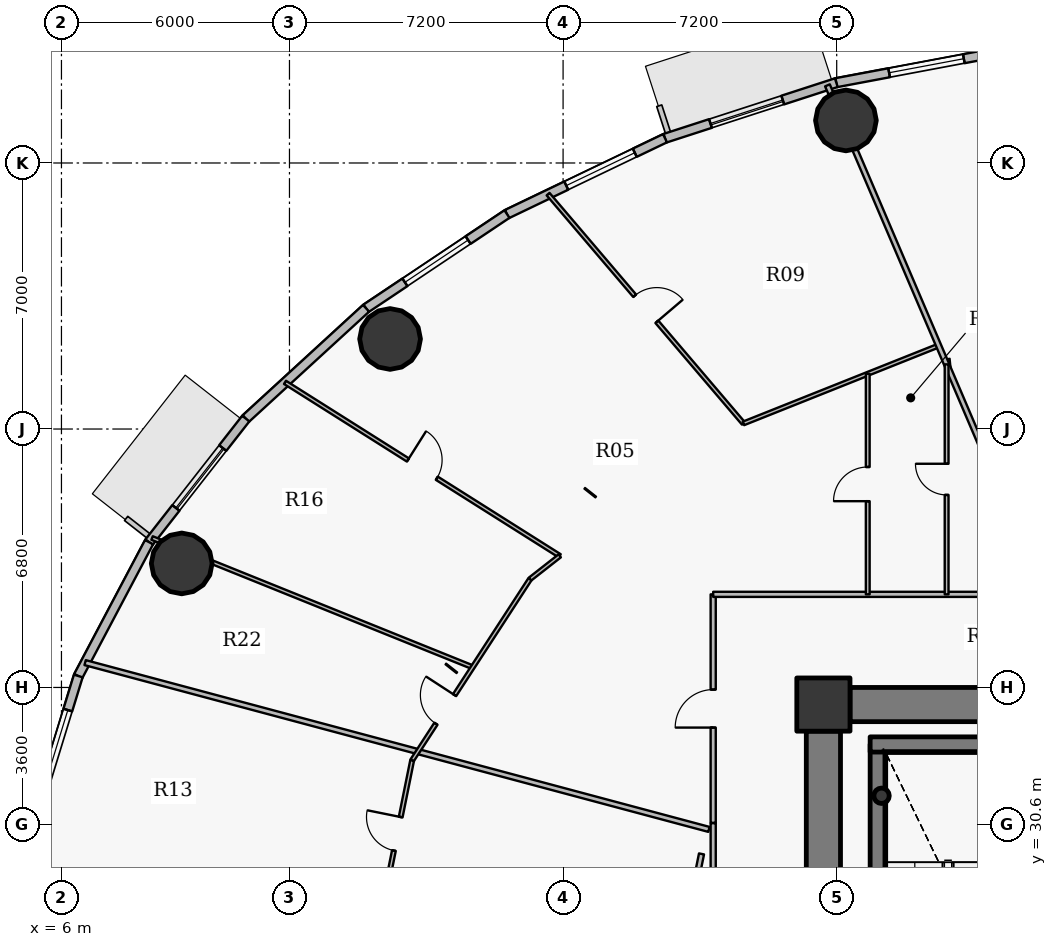
"""IFC4 building model, lengths in metres.
Left out: names, types, materials, properties, quantities, classifications, styles, units other than length and angle.
Written with IfcOpenShell. Run it as: python <this file> out.ifc"""

import sys

from ifc_helpers import new_model, si_unit, direction, frame, frame_2d, origin, origin_2d, place, context, subcontext, project, spatial, rectangle, hollow_circle, extrude, source, transform, mapped, element, fill, save


model = new_model("IFC4")
c1 = context("Model", 3, precision=1e-05, world=origin(), true_north=direction((0.0, 1.0)))
c2 = subcontext(c1, "Body", "Model", "MODEL_VIEW")
j1 = project(units=[si_unit("LENGTHUNIT", "METRE"), si_unit("PLANEANGLEUNIT", "RADIAN")], contexts=[c1])
p1 = place(None, origin())
s1 = spatial("IfcSite", under=j1, at=p1, CompositionType="ELEMENT")
p2 = place(p1, origin())
s2 = spatial("IfcBuilding", under=s1, at=p2, CompositionType="ELEMENT")
p3 = place(p2, frame((0.0, 0.0, 74.4)))
s3 = spatial("IfcBuildingStorey", under=s2, at=p3, CompositionType="ELEMENT", Elevation=74.4)
p4 = place(p3, frame((26.05, 33.75, 0.0), z_axis=(0.0, 0.0, 1.0), x_axis=(1.0, 0.0, 0.0)))
e1 = element("IfcColumn", 1, at=p4, inside=s3, PredefinedType="COLUMN", context=c2, shape_type="SweptSolid", body=[
    extrude(rectangle(XDim=1.4, YDim=1.4, at=origin_2d()), origin(), (0.0, 0.0, 1.0), 4.2),
])
p5 = place(p3, frame((27.48, 24.1, 0.0), z_axis=(0.0, 0.0, 1.0), x_axis=(0.0, 1.0, 0.0)))
e2 = element("IfcWall", 2, at=p5, inside=s3, PredefinedType="SHEAR", context=c2, shape_type="SweptSolid", body=[
    extrude(rectangle(XDim=8.6, YDim=0.4, at=frame_2d((4.3, 0.0))), origin(), (0.0, 0.0, 1.0), 4.2),
])
p6 = place(p3, frame((27.28, 32.7, 0.0), z_axis=(0.0, 0.0, 1.0), x_axis=(1.0, 0.0, 0.0)))
e3 = element("IfcWall", 3, at=p6, inside=s3, PredefinedType="SHEAR", context=c2, shape_type="SweptSolid", body=[
    extrude(rectangle(XDim=4.1, YDim=0.4, at=frame_2d((2.05, 0.0))), origin(), (0.0, 0.0, 1.0), 4.2),
])
p7 = place(p3, frame((27.58, 31.35, 0.0), z_axis=(0.0, 0.0, 1.0), x_axis=(1.0, 0.0, 0.0)))
e4 = element("IfcColumn", 4, at=p7, inside=s3, PredefinedType="COLUMN", context=c2, shape_type="SweptSolid", body=[
    extrude(hollow_circle(Radius=0.203, WallThickness=0.016, at=origin_2d()), origin(), (0.0, 0.0, 1.0), 4.2),
])
p8 = place(p3, frame((26.75, 33.75, 0.0), z_axis=(0.0, 0.0, 1.0), x_axis=(1.0, 0.0, 0.0)))
e5 = element("IfcWall", 5, at=p8, inside=s3, PredefinedType="SHEAR", context=c2, shape_type="SweptSolid", body=[
    extrude(rectangle(XDim=18.5, YDim=0.9, at=frame_2d((9.25, 0.0))), origin(), (0.0, 0.0, 1.0), 3.4),
])
p9 = place(p3, frame((26.05, 20.95, 0.0), z_axis=(0.0, 0.0, 1.0), x_axis=(0.0, 1.0, 0.0)))
e6 = element("IfcWall", 6, at=p9, inside=s3, PredefinedType="SHEAR", context=c2, shape_type="SweptSolid", body=[
    extrude(rectangle(XDim=12.1, YDim=0.9, at=frame_2d((6.05, 0.0))), origin(), (0.0, 0.0, 1.0), 3.4),
])
p10 = place(p9, frame((5.64, 0.0, 0.0)))
e7 = element("IfcOpeningElement", 7, at=p10, cuts=e6, PredefinedType="OPENING", context=c2, shape_type="SweptSolid", body=[
    extrude(rectangle(XDim=0.82, YDim=2.1, at=origin_2d()), frame((0.41, 0.46, 1.05), z_axis=(0.0, -1.0, 0.0), x_axis=(1.0, 0.0, 0.0)), (0.0, 0.0, 1.0), 0.92),
])
for number, where, z_axis, x_axis in (
    (8, (26.642, 49.12, 0.0), (0.0, 0.0, 1.0), (1.0, 0.0, 0.0)),
    (9, (14.647, 43.369, 0.0), (0.0, 0.0, 1.0), (1.0, 0.0, 0.0)),
    (10, (9.165, 37.464, 0.0), (0.0, 0.0, 1.0), (1.0, 0.0, 0.0)),
):
    element("IfcColumn", number, at=place(p3, frame(where, z_axis=z_axis, x_axis=x_axis)), inside=s3, PredefinedType="COLUMN", context=c2, shape_type="SweptSolid", body=[
        extrude(hollow_circle(Radius=0.8, WallThickness=0.045, at=origin_2d()), origin(), (0.0, 0.0, 1.0), 4.2),
    ])
p11 = place(p3, frame((26.389, 50.113, 0.0), z_axis=(0.0, 0.0, 1.0), x_axis=(0.982791952378, 0.184715939598, 0.0)))
e11 = element("IfcWall", 11, at=p11, inside=s3, PredefinedType="SOLIDWALL", context=c2, shape_type="SweptSolid", body=[
    extrude(rectangle(XDim=4.828, YDim=0.24, at=frame_2d((2.414, 0.0))), origin(), (0.0, 0.0, 1.0), 3.95),
])
p12 = place(p11, frame((1.414, 0.0, 0.9)))
e12 = element("IfcOpeningElement", 12, at=p12, cuts=e11, PredefinedType="OPENING", context=c2, shape_type="SweptSolid", body=[
    extrude(rectangle(XDim=2.0, YDim=1.75, at=origin_2d()), frame((1.0, 0.13, 0.875), z_axis=(0.0, -1.0, 0.0), x_axis=(1.0, 0.0, 0.0)), (0.0, 0.0, 1.0), 0.26),
])
p13 = place(p3, frame((21.882, 48.651, 0.0), z_axis=(0.0, 0.0, 1.0), x_axis=(0.951207699013, 0.308551313946, 0.0)))
e13 = element("IfcWall", 13, at=p13, inside=s3, PredefinedType="SOLIDWALL", context=c2, shape_type="SweptSolid", body=[
    extrude(rectangle(XDim=4.739, YDim=0.24, at=frame_2d((2.369, 0.0))), origin(), (0.0, 0.0, 1.0), 3.95),
])
p14 = place(p13, frame((1.258, 0.0, 0.9)))
e14 = element("IfcOpeningElement", 14, at=p14, cuts=e13, PredefinedType="OPENING", context=c2, shape_type="SweptSolid", body=[
    extrude(rectangle(XDim=2.0, YDim=1.75, at=origin_2d()), frame((1.0, 0.13, 0.875), z_axis=(0.0, -1.0, 0.0), x_axis=(1.0, 0.0, 0.0)), (0.0, 0.0, 1.0), 0.26),
])
p15 = place(p3, frame((17.723, 46.656, 0.0), z_axis=(0.0, 0.0, 1.0), x_axis=(0.901601503137, 0.432567601123, 0.0)))
e15 = element("IfcWall", 15, at=p15, inside=s3, PredefinedType="SOLIDWALL", context=c2, shape_type="SweptSolid", body=[
    extrude(rectangle(XDim=4.613, YDim=0.24, at=frame_2d((2.306, 0.0))), origin(), (0.0, 0.0, 1.0), 3.95),
])
p16 = place(p15, frame((1.731, 0.0, 0.9)))
e16 = element("IfcOpeningElement", 16, at=p16, cuts=e15, PredefinedType="OPENING", context=c2, shape_type="SweptSolid", body=[
    extrude(rectangle(XDim=2.0, YDim=1.75, at=origin_2d()), frame((1.0, 0.13, 0.875), z_axis=(0.0, -1.0, 0.0), x_axis=(1.0, 0.0, 0.0)), (0.0, 0.0, 1.0), 0.26),
])
p17 = place(p3, frame((14.015, 44.176, 0.0), z_axis=(0.0, 0.0, 1.0), x_axis=(0.831240982525, 0.555912249343, 0.0)))
e17 = element("IfcWall", 17, at=p17, inside=s3, PredefinedType="SOLIDWALL", context=c2, shape_type="SweptSolid", body=[
    extrude(rectangle(XDim=4.46, YDim=0.24, at=frame_2d((2.23, 0.0))), origin(), (0.0, 0.0, 1.0), 3.95),
])
p18 = place(p17, frame((1.23, 0.0, 0.9)))
e18 = element("IfcOpeningElement", 18, at=p18, cuts=e17, PredefinedType="OPENING", context=c2, shape_type="SweptSolid", body=[
    extrude(rectangle(XDim=2.0, YDim=1.75, at=origin_2d()), frame((1.0, 0.13, 0.875), z_axis=(0.0, -1.0, 0.0), x_axis=(1.0, 0.0, 0.0)), (0.0, 0.0, 1.0), 0.26),
])
p19 = place(p3, frame((10.85, 41.275, 0.0), z_axis=(0.0, 0.0, 1.0), x_axis=(0.737116376281, 0.67576582321, 0.0)))
e19 = element("IfcWall", 19, at=p19, inside=s3, PredefinedType="SOLIDWALL", context=c2, shape_type="SweptSolid", body=[
    extrude(rectangle(XDim=4.294, YDim=0.24, at=frame_2d((2.147, 0.0))), origin(), (0.0, 0.0, 1.0), 3.95),
])
p20 = place(p3, frame((8.305, 38.023, 0.0), z_axis=(0.0, 0.0, 1.0), x_axis=(0.616295508253, 0.787514981767, 0.0)))
e20 = element("IfcWall", 20, at=p20, inside=s3, PredefinedType="SOLIDWALL", context=c2, shape_type="SweptSolid", body=[
    extrude(rectangle(XDim=4.129, YDim=0.24, at=frame_2d((2.065, 0.0))), origin(), (0.0, 0.0, 1.0), 3.95),
])
p21 = place(p20, frame((1.146, 0.0, 0.9)))
e21 = element("IfcOpeningElement", 21, at=p21, cuts=e20, PredefinedType="OPENING", context=c2, shape_type="SweptSolid", body=[
    extrude(rectangle(XDim=2.0, YDim=1.75, at=origin_2d()), frame((1.0, 0.13, 0.875), z_axis=(0.0, -1.0, 0.0), x_axis=(1.0, 0.0, 0.0)), (0.0, 0.0, 1.0), 0.26),
])
p22 = place(p3, frame((6.442, 34.501, 0.0), z_axis=(0.0, 0.0, 1.0), x_axis=(0.467662443071, 0.883907144072, 0.0)))
e22 = element("IfcWall", 22, at=p22, inside=s3, PredefinedType="SOLIDWALL", context=c2, shape_type="SweptSolid", body=[
    extrude(rectangle(XDim=3.984, YDim=0.24, at=frame_2d((1.992, 0.0))), origin(), (0.0, 0.0, 1.0), 3.95),
])
p23 = place(p3, frame((5.307, 30.797, 0.0), z_axis=(0.0, 0.0, 1.0), x_axis=(0.293111631758, 0.956078224482, 0.0)))
e23 = element("IfcWall", 23, at=p23, inside=s3, PredefinedType="SOLIDWALL", context=c2, shape_type="SweptSolid", body=[
    extrude(rectangle(XDim=3.875, YDim=0.24, at=frame_2d((1.938, 0.0))), origin(), (0.0, 0.0, 1.0), 3.95),
])
p24 = place(p23, frame((0.938, 0.0, 0.9)))
e24 = element("IfcOpeningElement", 24, at=p24, cuts=e23, PredefinedType="OPENING", context=c2, shape_type="SweptSolid", body=[
    extrude(rectangle(XDim=2.0, YDim=1.75, at=origin_2d()), frame((1.0, 0.13, 0.875), z_axis=(0.0, -1.0, 0.0), x_axis=(1.0, 0.0, 0.0)), (0.0, 0.0, 1.0), 0.26),
])
p25 = place(p3, frame((6.623, 34.854, 0.0), z_axis=(0.0, 0.0, 1.0), x_axis=(0.966073053026, -0.258268961003, 0.0)))
e25 = element("IfcWall", 25, at=p25, inside=s3, PredefinedType="PARTITIONING", context=c2, shape_type="SweptSolid", body=[
    extrude(rectangle(XDim=16.991, YDim=0.135, at=frame_2d((8.495, 0.0))), origin(), (0.0, 0.0, 1.0), 3.335),
])
p26 = place(p3, frame((8.385, 38.132, 0.0), z_axis=(0.0, 0.0, 1.0), x_axis=(0.927473750459, -0.373888275037, 0.0)))
e26 = element("IfcWall", 26, at=p26, inside=s3, PredefinedType="PARTITIONING", context=c2, shape_type="SweptSolid", body=[
    extrude(rectangle(XDim=9.096, YDim=0.1, at=frame_2d((4.548, 0.0))), origin(), (0.0, 0.0, 1.0), 3.285),
])
p27 = place(p3, frame((11.882, 42.228, 0.0), z_axis=(0.0, 0.0, 1.0), x_axis=(0.845549287721, -0.533897370319, 0.0)))
e27 = element("IfcWall", 27, at=p27, inside=s3, PredefinedType="PARTITIONING", context=c2, shape_type="SweptSolid", body=[
    extrude(rectangle(XDim=8.55, YDim=0.1, at=frame_2d((4.275, 0.0))), origin(), (0.0, 0.0, 1.0), 3.335),
])
p28 = place(p27, frame((3.825, 0.0, 0.0)))
e28 = element("IfcOpeningElement", 28, at=p28, cuts=e27, PredefinedType="OPENING", context=c2, shape_type="SweptSolid", body=[
    extrude(rectangle(XDim=0.9, YDim=2.1, at=origin_2d()), frame((0.45, 0.06, 1.05), z_axis=(0.0, -1.0, 0.0), x_axis=(1.0, 0.0, 0.0)), (0.0, 0.0, 1.0), 0.12),
])
p29 = place(p3, frame((14.16, 27.0, 0.0), z_axis=(0.0, 0.0, 1.0), x_axis=(0.198292702032, 0.980142848936, 0.0)))
e29 = element("IfcWall", 29, at=p29, inside=s3, PredefinedType="PARTITIONING", context=c2, shape_type="SweptSolid", body=[
    extrude(rectangle(XDim=5.392, YDim=0.1, at=frame_2d((2.696, 0.0))), origin(), (0.0, 0.0, 1.0), 3.285),
])
p30 = place(p29, frame((2.967, 0.0, 0.0)))
e30 = element("IfcOpeningElement", 30, at=p30, cuts=e29, PredefinedType="OPENING", context=c2, shape_type="SweptSolid", body=[
    extrude(rectangle(XDim=0.9, YDim=2.1, at=origin_2d()), frame((0.45, 0.06, 1.05), z_axis=(0.0, -1.0, 0.0), x_axis=(1.0, 0.0, 0.0)), (0.0, 0.0, 1.0), 0.12),
])
p31 = place(p3, frame((15.229, 32.284, 0.0), z_axis=(0.0, 0.0, 1.0), x_axis=(0.545394142426, 0.83817971188, 0.0)))
e31 = element("IfcWall", 31, at=p31, inside=s3, PredefinedType="PARTITIONING", context=c2, shape_type="SweptSolid", body=[
    extrude(rectangle(XDim=5.688, YDim=0.1, at=frame_2d((2.844, 0.0))), origin(), (0.0, 0.0, 1.0), 3.285),
])
p32 = place(p31, frame((1.146, 0.0, 0.0)))
e32 = element("IfcOpeningElement", 32, at=p32, cuts=e31, PredefinedType="OPENING", context=c2, shape_type="SweptSolid", body=[
    extrude(rectangle(XDim=0.9, YDim=2.1, at=origin_2d()), frame((0.45, 0.06, 1.05), z_axis=(0.0, -1.0, 0.0), x_axis=(1.0, 0.0, 0.0)), (0.0, 0.0, 1.0), 0.12),
])
p33 = place(p3, frame((18.331, 37.052, 0.0), z_axis=(0.0, 0.0, 1.0), x_axis=(0.787385450927, 0.616460989575, 0.0)))
e33 = element("IfcWall", 33, at=p33, inside=s3, PredefinedType="PARTITIONING", context=c2, shape_type="SweptSolid", body=[
    extrude(rectangle(XDim=0.991, YDim=0.1, at=frame_2d((0.496, 0.0))), origin(), (0.0, 0.0, 1.0), 3.635),
])
p34 = place(p3, frame((18.805, 47.181, 0.0), z_axis=(0.0, 0.0, 1.0), x_axis=(0.648556358155, -0.761166637667, 0.0)))
e34 = element("IfcWall", 34, at=p34, inside=s3, PredefinedType="PARTITIONING", context=c2, shape_type="SweptSolid", body=[
    extrude(rectangle(XDim=7.926, YDim=0.1, at=frame_2d((3.963, 0.0))), origin(), (0.0, 0.0, 1.0), 3.335),
])
p35 = place(p34, frame((3.513, 0.0, 0.0)))
e35 = element("IfcOpeningElement", 35, at=p35, cuts=e34, PredefinedType="OPENING", context=c2, shape_type="SweptSolid", body=[
    extrude(rectangle(XDim=0.9, YDim=2.1, at=origin_2d()), frame((0.45, 0.06, 1.05), z_axis=(0.0, -1.0, 0.0), x_axis=(1.0, 0.0, 0.0)), (0.0, 0.0, 1.0), 0.12),
])
p36 = place(p3, frame((23.15, 30.638, 0.0), z_axis=(0.0, 0.0, 1.0), x_axis=(0.0, 1.0, 0.0)))
e36 = element("IfcWall", 36, at=p36, inside=s3, PredefinedType="PARTITIONING", context=c2, shape_type="SweptSolid", body=[
    extrude(rectangle(XDim=6.011, YDim=0.135, at=frame_2d((3.006, 0.0))), origin(), (0.0, 0.0, 1.0), 3.285),
])
p37 = place(p36, frame((2.506, 0.0, 0.0)))
e37 = element("IfcOpeningElement", 37, at=p37, cuts=e36, PredefinedType="OPENING", context=c2, shape_type="SweptSolid", body=[
    extrude(rectangle(XDim=1.0, YDim=2.15, at=origin_2d()), frame((0.5, 0.078, 1.075), z_axis=(0.0, -1.0, 0.0), x_axis=(1.0, 0.0, 0.0)), (0.0, 0.0, 1.0), 0.155),
])
p38 = place(p3, frame((23.15, 36.65, 0.0), z_axis=(0.0, 0.0, 1.0), x_axis=(1.0, 0.0, 0.0)))
e38 = element("IfcWall", 38, at=p38, inside=s3, PredefinedType="PARTITIONING", context=c2, shape_type="SweptSolid", body=[
    extrude(rectangle(XDim=7.171, YDim=0.135, at=frame_2d((3.586, 0.0))), origin(), (0.0, 0.0, 1.0), 3.285),
])
p39 = place(p3, frame((23.946, 41.147, 0.0), z_axis=(0.0, 0.0, 1.0), x_axis=(0.928805222761, 0.370568290834, 0.0)))
e39 = element("IfcWall", 39, at=p39, inside=s3, PredefinedType="PARTITIONING", context=c2, shape_type="SweptSolid", body=[
    extrude(rectangle(XDim=5.529, YDim=0.1, at=frame_2d((2.764, 0.0))), origin(), (0.0, 0.0, 1.0), 3.285),
])
p40 = place(p3, frame((26.156, 50.043, 0.0), z_axis=(0.0, 0.0, 1.0), x_axis=(0.392844637537, -0.919604855771, 0.0)))
e40 = element("IfcWall", 40, at=p40, inside=s3, PredefinedType="PARTITIONING", context=c2, shape_type="SweptSolid", body=[
    extrude(rectangle(XDim=13.987, YDim=0.135, at=frame_2d((6.993, 0.0))), origin(), (0.0, 0.0, 1.0), 3.285),
])
p41 = place(p3, frame((27.217, 36.65, 0.0), z_axis=(0.0, 0.0, 1.0), x_axis=(0.0, 1.0, 0.0)))
e41 = element("IfcWall", 41, at=p41, inside=s3, PredefinedType="PARTITIONING", context=c2, shape_type="SweptSolid", body=[
    extrude(rectangle(XDim=5.802, YDim=0.1, at=frame_2d((2.901, 0.0))), origin(), (0.0, 0.0, 1.0), 3.95),
])
p42 = place(p41, frame((2.451, 0.0, 0.0)))
e42 = element("IfcOpeningElement", 42, at=p42, cuts=e41, PredefinedType="OPENING", context=c2, shape_type="SweptSolid", body=[
    extrude(rectangle(XDim=0.9, YDim=2.1, at=origin_2d()), frame((0.45, 0.06, 1.05), z_axis=(0.0, -1.0, 0.0), x_axis=(1.0, 0.0, 0.0)), (0.0, 0.0, 1.0), 0.12),
])
p43 = place(p3, frame((29.292, 36.65, 0.0), z_axis=(0.0, 0.0, 1.0), x_axis=(0.0, 1.0, 0.0)))
e43 = element("IfcWall", 43, at=p43, inside=s3, PredefinedType="PARTITIONING", context=c2, shape_type="SweptSolid", body=[
    extrude(rectangle(XDim=6.052, YDim=0.1, at=frame_2d((3.026, 0.0))), origin(), (0.0, 0.0, 1.0), 3.285),
])
p44 = place(p43, frame((2.616, 0.0, 0.0)))
e44 = element("IfcOpeningElement", 44, at=p44, cuts=e43, PredefinedType="OPENING", context=c2, shape_type="SweptSolid", body=[
    extrude(rectangle(XDim=0.82, YDim=2.1, at=origin_2d()), frame((0.41, 0.06, 1.05), z_axis=(0.0, -1.0, 0.0), x_axis=(1.0, 0.0, 0.0)), (0.0, 0.0, 1.0), 0.12),
])
p45 = place(p3, frame((23.15, 26.089, 0.0), z_axis=(0.0, 0.0, 1.0), x_axis=(0.0, 1.0, 0.0)))
e45 = element("IfcWall", 45, at=p45, inside=s3, PredefinedType="PARTITIONING", context=c2, shape_type="SweptSolid", body=[
    extrude(rectangle(XDim=4.539, YDim=0.135, at=frame_2d((2.27, 0.0))), origin(), (0.0, 0.0, 1.0), 3.285),
])
p46 = place(p3, frame((26.74, 34.2, 0.0), z_axis=(0.0, 0.0, 1.0), x_axis=(-1.0, 0.0, 0.0)))
e46 = element("IfcWall", 46, at=p46, inside=s3, PredefinedType="PARTITIONING", context=c2, shape_type="SweptSolid", body=[
    extrude(rectangle(XDim=1.14, YDim=0.135, at=frame_2d((0.57, 0.0))), origin(), (0.0, 0.0, 1.0), 3.285),
])
p47 = place(p3, frame((25.6, 33.893, 0.0), z_axis=(0.0, 0.0, 1.0), x_axis=(0.0, -1.0, 0.0)))
e47 = element("IfcWall", 47, at=p47, inside=s3, PredefinedType="PARTITIONING", context=c2, shape_type="SweptSolid", body=[
    extrude(rectangle(XDim=0.833, YDim=0.135, at=frame_2d((0.416, 0.0))), origin(), (0.0, 0.0, 1.0), 3.95),
])
p48 = place(p3, frame((22.843, 29.82, 0.0), z_axis=(0.0, 0.0, 1.0), x_axis=(-0.19828576171, -0.980144253007, 0.0)))
e48 = element("IfcWall", 48, at=p48, inside=s3, PredefinedType="PARTITIONING", context=c2, shape_type="SweptSolid", body=[
    extrude(rectangle(XDim=2.877, YDim=0.135, at=frame_2d((1.439, 0.0))), origin(), (0.0, 0.0, 1.0), 3.285),
])
m1 = source(origin(), c2, "Body", "SweptSolid", [
    extrude(rectangle(XDim=2.0, YDim=1.75, at=origin_2d()), frame((1.0, 0.03, 0.875), z_axis=(0.0, -1.0, 0.0), x_axis=(1.0, 0.0, 0.0)), (0.0, 0.0, 1.0), 0.06),
])
p49 = place(p12, origin())
e49 = element("IfcWindow", 49, at=p49, inside=s3, PartitioningType="DOUBLE_PANEL_VERTICAL", PredefinedType="WINDOW", context=c2, shape_type="MappedRepresentation", body=[
    mapped(m1, transform((0.0, 0.0, 0.0), x_axis=(1.0, 0.0, 0.0), y_axis=(0.0, 1.0, 0.0), z_axis=(0.0, 0.0, 1.0), scale=1.0)),
])
fill(e12, e49)
p50 = place(p14, origin())
e50 = element("IfcWindow", 50, at=p50, inside=s3, PartitioningType="DOUBLE_PANEL_VERTICAL", PredefinedType="WINDOW", context=c2, shape_type="MappedRepresentation", body=[
    mapped(m1, transform((0.0, 0.0, 0.0), x_axis=(1.0, 0.0, 0.0), y_axis=(0.0, 1.0, 0.0), z_axis=(0.0, 0.0, 1.0), scale=1.0)),
])
fill(e14, e50)
p51 = place(p16, origin())
e51 = element("IfcWindow", 51, at=p51, inside=s3, PartitioningType="DOUBLE_PANEL_VERTICAL", PredefinedType="WINDOW", context=c2, shape_type="MappedRepresentation", body=[
    mapped(m1, transform((0.0, 0.0, 0.0), x_axis=(1.0, 0.0, 0.0), y_axis=(0.0, 1.0, 0.0), z_axis=(0.0, 0.0, 1.0), scale=1.0)),
])
fill(e16, e51)
p52 = place(p18, origin())
e52 = element("IfcWindow", 52, at=p52, inside=s3, PartitioningType="DOUBLE_PANEL_VERTICAL", PredefinedType="WINDOW", context=c2, shape_type="MappedRepresentation", body=[
    mapped(m1, transform((0.0, 0.0, 0.0), x_axis=(1.0, 0.0, 0.0), y_axis=(0.0, 1.0, 0.0), z_axis=(0.0, 0.0, 1.0), scale=1.0)),
])
fill(e18, e52)
p53 = place(p21, origin())
e53 = element("IfcWindow", 53, at=p53, inside=s3, PartitioningType="DOUBLE_PANEL_VERTICAL", PredefinedType="WINDOW", context=c2, shape_type="MappedRepresentation", body=[
    mapped(m1, transform((0.0, 0.0, 0.0), x_axis=(1.0, 0.0, 0.0), y_axis=(0.0, 1.0, 0.0), z_axis=(0.0, 0.0, 1.0), scale=1.0)),
])
fill(e21, e53)
p54 = place(p24, origin())
e54 = element("IfcWindow", 54, at=p54, inside=s3, PartitioningType="DOUBLE_PANEL_VERTICAL", PredefinedType="WINDOW", context=c2, shape_type="MappedRepresentation", body=[
    mapped(m1, transform((0.0, 0.0, 0.0), x_axis=(1.0, 0.0, 0.0), y_axis=(0.0, 1.0, 0.0), z_axis=(0.0, 0.0, 1.0), scale=1.0)),
])
fill(e24, e54)
m2 = source(origin(), c2, "Body", "SweptSolid", [
    extrude(rectangle(XDim=1.0, YDim=2.15, at=origin_2d()), frame((0.5, 0.025, 1.075), z_axis=(0.0, -1.0, 0.0), x_axis=(1.0, 0.0, 0.0)), (0.0, 0.0, 1.0), 0.05),
])
p55 = place(p37, origin())
e55 = element("IfcDoor", 55, at=p55, inside=s3, OperationType="SINGLE_SWING_LEFT", PredefinedType="DOOR", context=c2, shape_type="MappedRepresentation", body=[
    mapped(m2, transform((0.0, 0.0, 0.0), x_axis=(1.0, 0.0, 0.0), y_axis=(0.0, 1.0, 0.0), z_axis=(0.0, 0.0, 1.0), scale=1.0)),
])
fill(e37, e55)
m3 = source(origin(), c2, "Body", "SweptSolid", [
    extrude(rectangle(XDim=0.9, YDim=2.1, at=origin_2d()), frame((0.45, 0.025, 1.05), z_axis=(0.0, -1.0, 0.0), x_axis=(1.0, 0.0, 0.0)), (0.0, 0.0, 1.0), 0.05),
])
p56 = place(p35, origin())
e56 = element("IfcDoor", 56, at=p56, inside=s3, OperationType="SINGLE_SWING_RIGHT", PredefinedType="DOOR", context=c2, shape_type="MappedRepresentation", body=[
    mapped(m3, transform((0.0, 0.0, 0.0), x_axis=(1.0, 0.0, 0.0), y_axis=(0.0, 1.0, 0.0), z_axis=(0.0, 0.0, 1.0), scale=1.0)),
])
fill(e35, e56)
p57 = place(p28, origin())
e57 = element("IfcDoor", 57, at=p57, inside=s3, OperationType="SINGLE_SWING_LEFT", PredefinedType="DOOR", context=c2, shape_type="MappedRepresentation", body=[
    mapped(m3, transform((0.0, 0.0, 0.0), x_axis=(1.0, 0.0, 0.0), y_axis=(0.0, 1.0, 0.0), z_axis=(0.0, 0.0, 1.0), scale=1.0)),
])
fill(e28, e57)
p58 = place(p32, origin())
e58 = element("IfcDoor", 58, at=p58, inside=s3, OperationType="SINGLE_SWING_RIGHT", PredefinedType="DOOR", context=c2, shape_type="MappedRepresentation", body=[
    mapped(m3, transform((0.0, 0.0, 0.0), x_axis=(1.0, 0.0, 0.0), y_axis=(0.0, 1.0, 0.0), z_axis=(0.0, 0.0, 1.0), scale=1.0)),
])
fill(e32, e58)
p59 = place(p42, origin())
e59 = element("IfcDoor", 59, at=p59, inside=s3, OperationType="SINGLE_SWING_LEFT", PredefinedType="DOOR", context=c2, shape_type="MappedRepresentation", body=[
    mapped(m3, transform((0.0, 0.0, 0.0), x_axis=(1.0, 0.0, 0.0), y_axis=(0.0, 1.0, 0.0), z_axis=(0.0, 0.0, 1.0), scale=1.0)),
])
fill(e42, e59)
m4 = source(origin(), c2, "Body", "SweptSolid", [
    extrude(rectangle(XDim=0.82, YDim=2.1, at=origin_2d()), frame((0.41, 0.025, 1.05), z_axis=(0.0, -1.0, 0.0), x_axis=(1.0, 0.0, 0.0)), (0.0, 0.0, 1.0), 0.05),
])
p60 = place(p44, origin())
e60 = element("IfcDoor", 60, at=p60, inside=s3, OperationType="SINGLE_SWING_RIGHT", PredefinedType="DOOR", context=c2, shape_type="MappedRepresentation", body=[
    mapped(m4, transform((0.0, 0.0, 0.0), x_axis=(1.0, 0.0, 0.0), y_axis=(0.0, 1.0, 0.0), z_axis=(0.0, 0.0, 1.0), scale=1.0)),
])
fill(e44, e60)
p61 = place(p30, origin())
e61 = element("IfcDoor", 61, at=p61, inside=s3, OperationType="SINGLE_SWING_RIGHT", PredefinedType="DOOR", context=c2, shape_type="MappedRepresentation", body=[
    mapped(m3, transform((0.0, 0.0, 0.0), x_axis=(1.0, 0.0, 0.0), y_axis=(0.0, 1.0, 0.0), z_axis=(0.0, 0.0, 1.0), scale=1.0)),
])
fill(e30, e61)
save(model, sys.argv[1])
